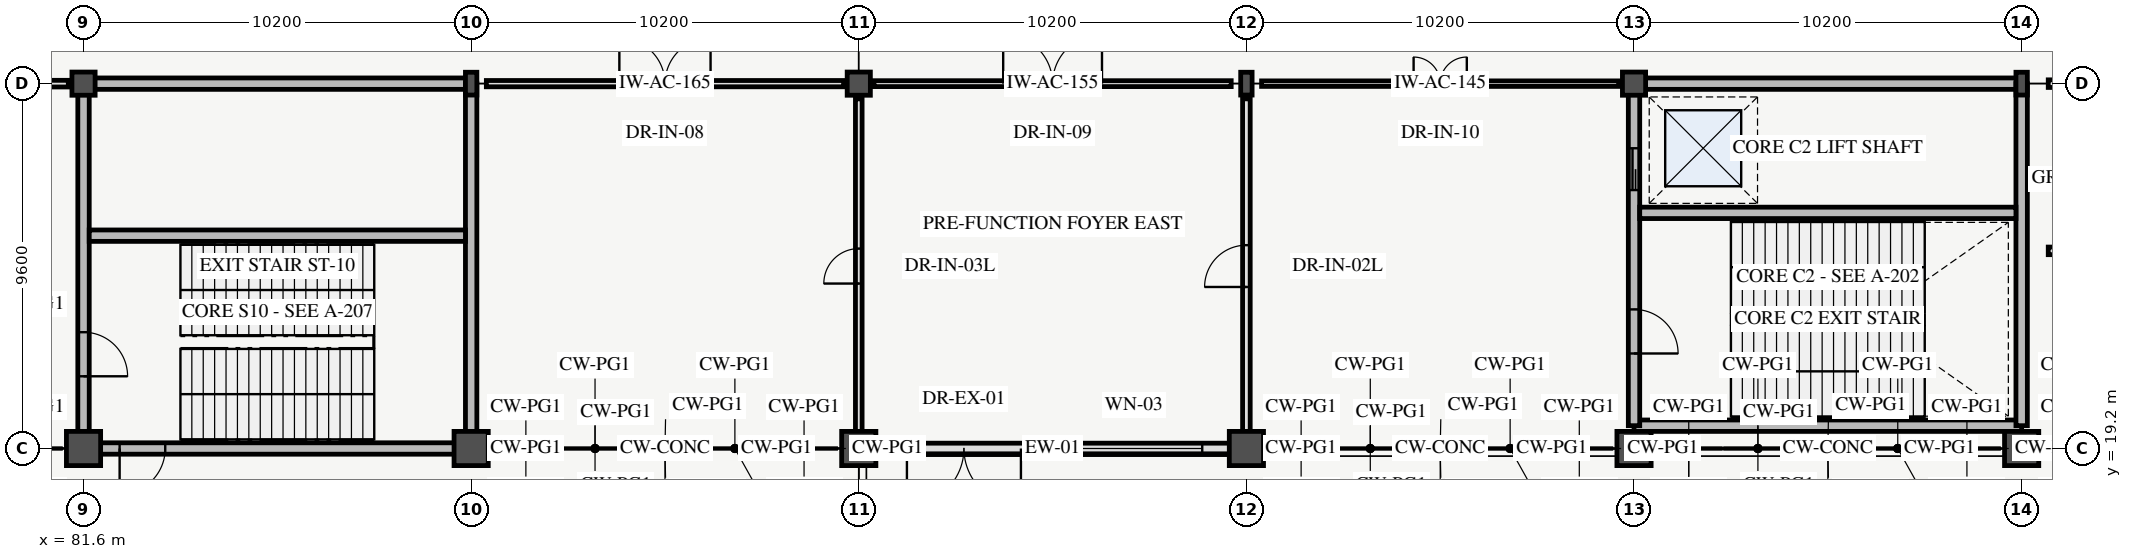
"""IFC4 building model, lengths in metres.
Left out: names, types, materials, properties, quantities, classifications, styles, units other than length and angle.
Written with IfcOpenShell. Run it as: python <this file> out.ifc"""

import sys

from ifc_helpers import new_model, si_unit, direction, frame, frame_2d, origin, origin_2d, place, context, subcontext, project, spatial, rectangle, hollow_circle, i_section, extrude, element, fill, save


model = new_model("IFC4")
c1 = context("Model", 3, precision=1e-05, world=origin(), true_north=direction((0.0, 1.0)))
c2 = subcontext(c1, "Body", "Model", "MODEL_VIEW")
j1 = project(units=[si_unit("LENGTHUNIT", "METRE"), si_unit("PLANEANGLEUNIT", "RADIAN")], contexts=[c1])
p1 = place(None, origin())
s1 = spatial("IfcSite", under=j1, at=p1, CompositionType="ELEMENT")
p2 = place(p1, origin())
s2 = spatial("IfcBuilding", under=s1, at=p2, CompositionType="ELEMENT")
p3 = place(p2, origin())
s3 = spatial("IfcBuildingStorey", under=s2, at=p3, CompositionType="ELEMENT", Elevation=0.0)
p4 = place(p3, frame((81.6, 19.2, 0.0), z_axis=(0.0, 0.0, 1.0), x_axis=(1.0, 0.0, 0.0)))
e1 = element("IfcColumn", 1, at=p4, inside=s3, PredefinedType="COLUMN", context=c2, shape_type="SweptSolid", body=[
    extrude(rectangle(XDim=0.9, YDim=0.9, at=origin_2d()), origin(), (0.0, 0.0, 1.0), 5.4),
])
p5 = place(p3, frame((81.6, 28.8, 0.0), z_axis=(0.0, 0.0, 1.0), x_axis=(1.0, 0.0, 0.0)))
e2 = element("IfcColumn", 2, at=p5, inside=s3, PredefinedType="COLUMN", context=c2, shape_type="SweptSolid", body=[
    extrude(hollow_circle(Radius=0.305, WallThickness=0.025, at=origin_2d()), origin(), (0.0, 0.0, 1.0), 5.4),
])
p6 = place(p3, frame((91.8, 19.2, 0.0), z_axis=(0.0, 0.0, 1.0), x_axis=(1.0, 0.0, 0.0)))
e3 = element("IfcColumn", 3, at=p6, inside=s3, PredefinedType="COLUMN", context=c2, shape_type="SweptSolid", body=[
    extrude(rectangle(XDim=0.9, YDim=0.9, at=origin_2d()), origin(), (0.0, 0.0, 1.0), 5.4),
])
p7 = place(p3, frame((91.8, 28.8, 0.0), z_axis=(0.0, 0.0, 1.0), x_axis=(1.0, 0.0, 0.0)))
e4 = element("IfcColumn", 4, at=p7, inside=s3, PredefinedType="COLUMN", context=c2, shape_type="SweptSolid", body=[
    extrude(i_section(OverallWidth=0.3, OverallDepth=0.6, WebThickness=0.015, FlangeThickness=0.03, FilletRadius=0.027, at=origin_2d()), origin(), (0.0, 0.0, 1.0), 5.4),
])
p8 = place(p3, frame((102.0, 19.2, 0.0), z_axis=(0.0, 0.0, 1.0), x_axis=(1.0, 0.0, 0.0)))
e5 = element("IfcColumn", 5, at=p8, inside=s3, PredefinedType="COLUMN", context=c2, shape_type="SweptSolid", body=[
    extrude(rectangle(XDim=0.9, YDim=0.9, at=origin_2d()), origin(), (0.0, 0.0, 1.0), 5.4),
])
p9 = place(p3, frame((102.0, 28.8, 0.0), z_axis=(0.0, 0.0, 1.0), x_axis=(1.0, 0.0, 0.0)))
e6 = element("IfcColumn", 6, at=p9, inside=s3, PredefinedType="COLUMN", context=c2, shape_type="SweptSolid", body=[
    extrude(hollow_circle(Radius=0.305, WallThickness=0.025, at=origin_2d()), origin(), (0.0, 0.0, 1.0), 5.4),
])
p10 = place(p3, frame((112.2, 19.2, 0.0), z_axis=(0.0, 0.0, 1.0), x_axis=(1.0, 0.0, 0.0)))
e7 = element("IfcColumn", 7, at=p10, inside=s3, PredefinedType="COLUMN", context=c2, shape_type="SweptSolid", body=[
    extrude(rectangle(XDim=0.9, YDim=0.9, at=origin_2d()), origin(), (0.0, 0.0, 1.0), 5.4),
])
p11 = place(p3, frame((112.2, 28.8, 0.0), z_axis=(0.0, 0.0, 1.0), x_axis=(1.0, 0.0, 0.0)))
e8 = element("IfcColumn", 8, at=p11, inside=s3, PredefinedType="COLUMN", context=c2, shape_type="SweptSolid", body=[
    extrude(i_section(OverallWidth=0.3, OverallDepth=0.6, WebThickness=0.015, FlangeThickness=0.03, FilletRadius=0.027, at=origin_2d()), origin(), (0.0, 0.0, 1.0), 5.4),
])
p12 = place(p3, frame((122.4, 19.2, 0.0), z_axis=(0.0, 0.0, 1.0), x_axis=(1.0, 0.0, 0.0)))
e9 = element("IfcColumn", 9, at=p12, inside=s3, PredefinedType="COLUMN", context=c2, shape_type="SweptSolid", body=[
    extrude(rectangle(XDim=0.9, YDim=0.9, at=origin_2d()), origin(), (0.0, 0.0, 1.0), 5.4),
])
p13 = place(p3, frame((122.4, 28.8, 0.0), z_axis=(0.0, 0.0, 1.0), x_axis=(1.0, 0.0, 0.0)))
e10 = element("IfcColumn", 10, at=p13, inside=s3, PredefinedType="COLUMN", context=c2, shape_type="SweptSolid", body=[
    extrude(hollow_circle(Radius=0.305, WallThickness=0.025, at=origin_2d()), origin(), (0.0, 0.0, 1.0), 5.4),
])
p14 = place(p3, frame((132.6, 19.2, 0.0), z_axis=(0.0, 0.0, 1.0), x_axis=(1.0, 0.0, 0.0)))
e11 = element("IfcColumn", 11, at=p14, inside=s3, PredefinedType="COLUMN", context=c2, shape_type="SweptSolid", body=[
    extrude(rectangle(XDim=0.9, YDim=0.9, at=origin_2d()), origin(), (0.0, 0.0, 1.0), 5.4),
])
p15 = place(p3, frame((132.6, 28.8, 0.0), z_axis=(0.0, 0.0, 1.0), x_axis=(1.0, 0.0, 0.0)))
e12 = element("IfcColumn", 12, at=p15, inside=s3, PredefinedType="COLUMN", context=c2, shape_type="SweptSolid", body=[
    extrude(i_section(OverallWidth=0.3, OverallDepth=0.6, WebThickness=0.015, FlangeThickness=0.03, FilletRadius=0.027, at=origin_2d()), origin(), (0.0, 0.0, 1.0), 5.4),
])
for number, where, z_axis, x_axis in (
    (13, (122.4, 19.8, 0.0), (0.0, 0.0, 1.0), (1.0, 0.0, 0.0)),
    (14, (122.4, 28.8, 0.0), (0.0, 0.0, 1.0), (1.0, 0.0, 0.0)),
):
    element("IfcWall", number, at=place(p3, frame(where, z_axis=z_axis, x_axis=x_axis)), inside=s3, PredefinedType="SHEAR", context=c2, shape_type="SweptSolid", body=[
        extrude(rectangle(XDim=10.2, YDim=0.3, at=frame_2d((5.1, 0.0))), origin(), (0.0, 0.0, 1.0), 5.4),
    ])
p16 = place(p3, frame((122.4, 19.8, 0.0), z_axis=(0.0, 0.0, 1.0), x_axis=(0.0, 1.0, 0.0)))
e15 = element("IfcWall", 15, at=p16, inside=s3, PredefinedType="SHEAR", context=c2, shape_type="SweptSolid", body=[
    extrude(rectangle(XDim=9.0, YDim=0.3, at=frame_2d((4.5, 0.0))), origin(), (0.0, 0.0, 1.0), 5.4),
])
p17 = place(p16, frame((1.9, 0.0, 0.0)))
e16 = element("IfcOpeningElement", 16, at=p17, cuts=e15, PredefinedType="OPENING", context=c2, shape_type="SweptSolid", body=[
    extrude(rectangle(XDim=1.16, YDim=2.2, at=frame_2d((0.58, 1.1))), frame((0.0, 0.16, 0.0), z_axis=(0.0, -1.0, 0.0), x_axis=(1.0, 0.0, 0.0)), (0.0, 0.0, 1.0), 0.32),
])
p18 = place(p16, frame((6.2, 0.0, 0.0)))
e17 = element("IfcOpeningElement", 17, at=p18, cuts=e15, PredefinedType="OPENING", context=c2, shape_type="SweptSolid", body=[
    extrude(rectangle(XDim=1.1, YDim=2.2, at=frame_2d((0.55, 1.1))), frame((0.0, 0.16, 0.0), z_axis=(0.0, -1.0, 0.0), x_axis=(1.0, 0.0, 0.0)), (0.0, 0.0, 1.0), 0.32),
])
p19 = place(p3, frame((132.6, 19.8, 0.0), z_axis=(0.0, 0.0, 1.0), x_axis=(0.0, 1.0, 0.0)))
e18 = element("IfcWall", 18, at=p19, inside=s3, PredefinedType="SHEAR", context=c2, shape_type="SweptSolid", body=[
    extrude(rectangle(XDim=9.0, YDim=0.3, at=frame_2d((4.5, 0.0))), origin(), (0.0, 0.0, 1.0), 5.4),
])
p20 = place(p3, frame((102.24, 19.2, 0.0), z_axis=(0.0, 0.0, 1.0), x_axis=(1.0, 0.0, 0.0)))
e19 = element("IfcWall", 19, at=p20, inside=s3, PredefinedType="STANDARD", context=c2, shape_type="SweptSolid", body=[
    extrude(rectangle(XDim=9.72, YDim=0.28, at=frame_2d((4.86, 0.0))), origin(), (0.0, 0.0, 1.0), 3.68),
])
p21 = place(p20, frame((1.027, 0.0, 0.0)))
e20 = element("IfcOpeningElement", 20, at=p21, cuts=e19, PredefinedType="OPENING", context=c2, shape_type="SweptSolid", body=[
    extrude(rectangle(XDim=3.0, YDim=2.5, at=frame_2d((1.5, 1.25))), frame((0.0, 0.15, 0.0), z_axis=(0.0, -1.0, 0.0), x_axis=(1.0, 0.0, 0.0)), (0.0, 0.0, 1.0), 0.3),
])
p22 = place(p20, frame((5.198, 0.0, 0.85)))
e21 = element("IfcOpeningElement", 21, at=p22, cuts=e19, PredefinedType="OPENING", context=c2, shape_type="SweptSolid", body=[
    extrude(rectangle(XDim=3.6, YDim=2.1, at=frame_2d((1.8, 1.05))), frame((0.0, 0.15, 0.0), z_axis=(0.0, -1.0, 0.0), x_axis=(1.0, 0.0, 0.0)), (0.0, 0.0, 1.0), 0.3),
])
p23 = place(p3, frame((122.55, 25.4, 0.0), z_axis=(0.0, 0.0, 1.0), x_axis=(1.0, 0.0, 0.0)))
e22 = element("IfcWall", 22, at=p23, inside=s3, PredefinedType="SHEAR", context=c2, shape_type="SweptSolid", body=[
    extrude(rectangle(XDim=9.9, YDim=0.3, at=frame_2d((4.95, 0.0))), origin(), (0.0, 0.0, 1.0), 5.4),
])
p24 = place(p3, frame((81.6, 19.2, 0.0), z_axis=(0.0, 0.0, 1.0), x_axis=(1.0, 0.0, 0.0)))
e23 = element("IfcWall", 23, at=p24, inside=s3, PredefinedType="SHEAR", context=c2, shape_type="SweptSolid", body=[
    extrude(rectangle(XDim=10.2, YDim=0.3, at=frame_2d((5.1, 0.0))), origin(), (0.0, 0.0, 1.0), 5.4),
])
p25 = place(p24, frame((0.95, 0.0, 0.0)))
e24 = element("IfcOpeningElement", 24, at=p25, cuts=e23, PredefinedType="OPENING", context=c2, shape_type="SweptSolid", body=[
    extrude(rectangle(XDim=1.2, YDim=2.2, at=frame_2d((0.6, 1.1))), frame((0.0, 0.16, 0.0), z_axis=(0.0, -1.0, 0.0), x_axis=(1.0, 0.0, 0.0)), (0.0, 0.0, 1.0), 0.32),
])
p26 = place(p3, frame((81.6, 28.8, 0.0), z_axis=(0.0, 0.0, 1.0), x_axis=(1.0, 0.0, 0.0)))
e25 = element("IfcWall", 25, at=p26, inside=s3, PredefinedType="SHEAR", context=c2, shape_type="SweptSolid", body=[
    extrude(rectangle(XDim=10.2, YDim=0.3, at=frame_2d((5.1, 0.0))), origin(), (0.0, 0.0, 1.0), 5.4),
])
p27 = place(p3, frame((81.6, 19.2, 0.0), z_axis=(0.0, 0.0, 1.0), x_axis=(0.0, 1.0, 0.0)))
e26 = element("IfcWall", 26, at=p27, inside=s3, PredefinedType="SHEAR", context=c2, shape_type="SweptSolid", body=[
    extrude(rectangle(XDim=9.6, YDim=0.3, at=frame_2d((4.8, 0.0))), origin(), (0.0, 0.0, 1.0), 5.4),
])
p28 = place(p27, frame((1.9, 0.0, 0.0)))
e27 = element("IfcOpeningElement", 27, at=p28, cuts=e26, PredefinedType="OPENING", context=c2, shape_type="SweptSolid", body=[
    extrude(rectangle(XDim=1.16, YDim=2.2, at=frame_2d((0.58, 1.1))), frame((0.0, 0.16, 0.0), z_axis=(0.0, -1.0, 0.0), x_axis=(1.0, 0.0, 0.0)), (0.0, 0.0, 1.0), 0.32),
])
p29 = place(p3, frame((91.8, 19.2, 0.0), z_axis=(0.0, 0.0, 1.0), x_axis=(0.0, 1.0, 0.0)))
e28 = element("IfcWall", 28, at=p29, inside=s3, PredefinedType="SHEAR", context=c2, shape_type="SweptSolid", body=[
    extrude(rectangle(XDim=9.6, YDim=0.3, at=frame_2d((4.8, 0.0))), origin(), (0.0, 0.0, 1.0), 5.4),
])
p30 = place(p3, frame((81.75, 24.8, 0.0), z_axis=(0.0, 0.0, 1.0), x_axis=(1.0, 0.0, 0.0)))
e29 = element("IfcWall", 29, at=p30, inside=s3, PredefinedType="SHEAR", context=c2, shape_type="SweptSolid", body=[
    extrude(rectangle(XDim=9.9, YDim=0.3, at=frame_2d((4.95, 0.0))), origin(), (0.0, 0.0, 1.0), 5.4),
])
p31 = place(p3, frame((71.8, 28.8, 0.0), z_axis=(0.0, 0.0, 1.0), x_axis=(1.0, 0.0, 0.0)))
e30 = element("IfcWall", 30, at=p31, inside=s3, PredefinedType="PARTITIONING", context=c2, shape_type="SweptSolid", body=[
    extrude(rectangle(XDim=9.4, YDim=0.175, at=frame_2d((4.7, 0.0))), origin(), (0.0, 0.0, 1.0), 4.08),
])
p32 = place(p31, frame((3.6, 0.0, 0.0)))
e31 = element("IfcOpeningElement", 31, at=p32, cuts=e30, PredefinedType="OPENING", context=c2, shape_type="SweptSolid", body=[
    extrude(rectangle(XDim=2.2, YDim=2.35, at=frame_2d((1.1, 1.175))), frame((0.0, 0.097, 0.0), z_axis=(0.0, -1.0, 0.0), x_axis=(1.0, 0.0, 0.0)), (0.0, 0.0, 1.0), 0.195),
])
p33 = place(p3, frame((92.2, 28.8, 0.0), z_axis=(0.0, 0.0, 1.0), x_axis=(1.0, 0.0, 0.0)))
e32 = element("IfcWall", 32, at=p33, inside=s3, PredefinedType="PARTITIONING", context=c2, shape_type="SweptSolid", body=[
    extrude(rectangle(XDim=9.4, YDim=0.165, at=frame_2d((4.7, 0.0))), origin(), (0.0, 0.0, 1.0), 4.08),
])
p34 = place(p33, frame((3.5, 0.0, 0.0)))
e33 = element("IfcOpeningElement", 33, at=p34, cuts=e32, PredefinedType="OPENING", context=c2, shape_type="SweptSolid", body=[
    extrude(rectangle(XDim=2.4, YDim=2.4, at=frame_2d((1.2, 1.2))), frame((0.0, 0.093, 0.0), z_axis=(0.0, -1.0, 0.0), x_axis=(1.0, 0.0, 0.0)), (0.0, 0.0, 1.0), 0.185),
])
p35 = place(p3, frame((102.4, 28.8, 0.0), z_axis=(0.0, 0.0, 1.0), x_axis=(1.0, 0.0, 0.0)))
e34 = element("IfcWall", 34, at=p35, inside=s3, PredefinedType="PARTITIONING", context=c2, shape_type="SweptSolid", body=[
    extrude(rectangle(XDim=9.4, YDim=0.155, at=frame_2d((4.7, 0.0))), origin(), (0.0, 0.0, 1.0), 4.08),
])
p36 = place(p35, frame((3.4, 0.0, 0.0)))
e35 = element("IfcOpeningElement", 35, at=p36, cuts=e34, PredefinedType="OPENING", context=c2, shape_type="SweptSolid", body=[
    extrude(rectangle(XDim=2.6, YDim=2.4, at=frame_2d((1.3, 1.2))), frame((0.0, 0.087, 0.0), z_axis=(0.0, -1.0, 0.0), x_axis=(1.0, 0.0, 0.0)), (0.0, 0.0, 1.0), 0.175),
])
p37 = place(p3, frame((112.6, 28.8, 0.0), z_axis=(0.0, 0.0, 1.0), x_axis=(1.0, 0.0, 0.0)))
e36 = element("IfcWall", 36, at=p37, inside=s3, PredefinedType="PARTITIONING", context=c2, shape_type="SweptSolid", body=[
    extrude(rectangle(XDim=9.4, YDim=0.145, at=frame_2d((4.7, 0.0))), origin(), (0.0, 0.0, 1.0), 4.08),
])
p38 = place(p37, frame((4.0, 0.0, 0.0)))
e37 = element("IfcOpeningElement", 37, at=p38, cuts=e36, PredefinedType="OPENING", context=c2, shape_type="SweptSolid", body=[
    extrude(rectangle(XDim=1.4, YDim=2.2, at=frame_2d((0.7, 1.1))), frame((0.0, 0.083, 0.0), z_axis=(0.0, -1.0, 0.0), x_axis=(1.0, 0.0, 0.0)), (0.0, 0.0, 1.0), 0.165),
])
p39 = place(p3, frame((133.3, 24.4, 0.0), z_axis=(0.0, 0.0, 1.0), x_axis=(1.0, 0.0, 0.0)))
e38 = element("IfcWall", 38, at=p39, inside=s3, PredefinedType="PARTITIONING", context=c2, shape_type="SweptSolid", body=[
    extrude(rectangle(XDim=4.0, YDim=0.2, at=frame_2d((2.0, 0.0))), origin(), (0.0, 0.0, 1.0), 4.08),
])
p40 = place(p39, frame((1.475, 0.0, 0.0)))
e39 = element("IfcOpeningElement", 39, at=p40, cuts=e38, PredefinedType="OPENING", context=c2, shape_type="SweptSolid", body=[
    extrude(rectangle(XDim=1.05, YDim=2.15, at=frame_2d((0.525, 1.075))), frame((0.0, 0.11, 0.0), z_axis=(0.0, -1.0, 0.0), x_axis=(1.0, 0.0, 0.0)), (0.0, 0.0, 1.0), 0.22),
])
p41 = place(p3, frame((133.3, 28.8, 0.0), z_axis=(0.0, 0.0, 1.0), x_axis=(1.0, 0.0, 0.0)))
e40 = element("IfcWall", 40, at=p41, inside=s3, PredefinedType="PARTITIONING", context=c2, shape_type="SweptSolid", body=[
    extrude(rectangle(XDim=9.1, YDim=0.2, at=frame_2d((4.55, 0.0))), origin(), (0.0, 0.0, 1.0), 4.08),
])
p42 = place(p41, frame((3.975, 0.0, 0.0)))
e41 = element("IfcOpeningElement", 41, at=p42, cuts=e40, PredefinedType="OPENING", context=c2, shape_type="SweptSolid", body=[
    extrude(rectangle(XDim=1.15, YDim=2.2, at=frame_2d((0.575, 1.1))), frame((0.0, 0.11, 0.0), z_axis=(0.0, -1.0, 0.0), x_axis=(1.0, 0.0, 0.0)), (0.0, 0.0, 1.0), 0.22),
])
p43 = place(p3, frame((112.2, 19.6, 0.0), z_axis=(0.0, 0.0, 1.0), x_axis=(0.0, 1.0, 0.0)))
e42 = element("IfcWall", 42, at=p43, inside=s3, PredefinedType="PARTITIONING", context=c2, shape_type="SweptSolid", body=[
    extrude(rectangle(XDim=8.8, YDim=0.2, at=frame_2d((4.4, 0.0))), origin(), (0.0, 0.0, 1.0), 4.08),
])
p44 = place(p43, frame((3.85, 0.0, 0.0)))
e43 = element("IfcOpeningElement", 43, at=p44, cuts=e42, PredefinedType="OPENING", context=c2, shape_type="SweptSolid", body=[
    extrude(rectangle(XDim=1.1, YDim=2.2, at=frame_2d((0.55, 1.1))), frame((0.0, 0.11, 0.0), z_axis=(0.0, -1.0, 0.0), x_axis=(1.0, 0.0, 0.0)), (0.0, 0.0, 1.0), 0.22),
])
p45 = place(p3, frame((102.0, 19.6, 0.0), z_axis=(0.0, 0.0, 1.0), x_axis=(0.0, 1.0, 0.0)))
e44 = element("IfcWall", 44, at=p45, inside=s3, PredefinedType="PARTITIONING", context=c2, shape_type="SweptSolid", body=[
    extrude(rectangle(XDim=8.8, YDim=0.175, at=frame_2d((4.4, 0.0))), origin(), (0.0, 0.0, 1.0), 4.08),
])
p46 = place(p45, frame((3.94, 0.0, 0.0)))
e45 = element("IfcOpeningElement", 45, at=p46, cuts=e44, PredefinedType="OPENING", context=c2, shape_type="SweptSolid", body=[
    extrude(rectangle(XDim=0.92, YDim=2.1, at=frame_2d((0.46, 1.05))), frame((0.0, 0.097, 0.0), z_axis=(0.0, -1.0, 0.0), x_axis=(1.0, 0.0, 0.0)), (0.0, 0.0, 1.0), 0.195),
])
p47 = place(p21, frame((3.0, 0.0, 0.0), z_axis=(0.0, 0.0, 1.0), x_axis=(-1.0, 0.0, 0.0)))
e46 = element("IfcDoor", 46, at=p47, inside=s3, OperationType="DOUBLE_DOOR_SINGLE_SWING", PredefinedType="DOOR", context=c2, shape_type="SweptSolid", body=[
    extrude(rectangle(XDim=3.0, YDim=2.5, at=frame_2d((1.5, 1.25))), frame((0.0, 0.025, 0.0), z_axis=(0.0, -1.0, 0.0), x_axis=(1.0, 0.0, 0.0)), (0.0, 0.0, 1.0), 0.05),
])
fill(e20, e46)
p48 = place(p22, origin())
e47 = element("IfcWindow", 47, at=p48, inside=s3, PartitioningType="TRIPLE_PANEL_VERTICAL", PredefinedType="WINDOW", context=c2, shape_type="SweptSolid", body=[
    extrude(rectangle(XDim=3.6, YDim=2.1, at=frame_2d((1.8, 1.05))), frame((0.0, 0.03, 0.0), z_axis=(0.0, -1.0, 0.0), x_axis=(1.0, 0.0, 0.0)), (0.0, 0.0, 1.0), 0.06),
])
fill(e21, e47)
p49 = place(p17, origin())
e48 = element("IfcDoor", 48, at=p49, inside=s3, OperationType="SINGLE_SWING_LEFT", PredefinedType="DOOR", context=c2, shape_type="SweptSolid", body=[
    extrude(rectangle(XDim=1.16, YDim=2.2, at=frame_2d((0.58, 1.1))), frame((0.0, 0.025, 0.0), z_axis=(0.0, -1.0, 0.0), x_axis=(1.0, 0.0, 0.0)), (0.0, 0.0, 1.0), 0.05),
])
fill(e16, e48)
p50 = place(p18, origin())
e49 = element("IfcDoor", 49, at=p50, inside=s3, OperationType="SLIDING_TO_RIGHT", PredefinedType="DOOR", context=c2, shape_type="SweptSolid", body=[
    extrude(rectangle(XDim=1.1, YDim=2.2, at=frame_2d((0.55, 1.1))), frame((0.0, 0.025, 0.0), z_axis=(0.0, -1.0, 0.0), x_axis=(1.0, 0.0, 0.0)), (0.0, 0.0, 1.0), 0.05),
])
fill(e17, e49)
p51 = place(p28, origin())
e50 = element("IfcDoor", 50, at=p51, inside=s3, OperationType="SINGLE_SWING_LEFT", PredefinedType="DOOR", context=c2, shape_type="SweptSolid", body=[
    extrude(rectangle(XDim=1.16, YDim=2.2, at=frame_2d((0.58, 1.1))), frame((0.0, 0.025, 0.0), z_axis=(0.0, -1.0, 0.0), x_axis=(1.0, 0.0, 0.0)), (0.0, 0.0, 1.0), 0.05),
])
fill(e27, e50)
p52 = place(p25, frame((1.2, 0.0, 0.0), z_axis=(0.0, 0.0, 1.0), x_axis=(-1.0, 0.0, 0.0)))
e51 = element("IfcDoor", 51, at=p52, inside=s3, OperationType="SINGLE_SWING_LEFT", PredefinedType="DOOR", context=c2, shape_type="SweptSolid", body=[
    extrude(rectangle(XDim=1.2, YDim=2.2, at=frame_2d((0.6, 1.1))), frame((0.0, 0.025, 0.0), z_axis=(0.0, -1.0, 0.0), x_axis=(1.0, 0.0, 0.0)), (0.0, 0.0, 1.0), 0.05),
])
fill(e24, e51)
p53 = place(p34, origin())
e52 = element("IfcDoor", 52, at=p53, inside=s3, OperationType="DOUBLE_DOOR_SINGLE_SWING", PredefinedType="DOOR", context=c2, shape_type="SweptSolid", body=[
    extrude(rectangle(XDim=2.4, YDim=2.4, at=frame_2d((1.2, 1.2))), frame((0.0, 0.025, 0.0), z_axis=(0.0, -1.0, 0.0), x_axis=(1.0, 0.0, 0.0)), (0.0, 0.0, 1.0), 0.05),
])
fill(e33, e52)
p54 = place(p36, origin())
e53 = element("IfcDoor", 53, at=p54, inside=s3, OperationType="DOUBLE_DOOR_SINGLE_SWING", PredefinedType="DOOR", context=c2, shape_type="SweptSolid", body=[
    extrude(rectangle(XDim=2.6, YDim=2.4, at=frame_2d((1.3, 1.2))), frame((0.0, 0.025, 0.0), z_axis=(0.0, -1.0, 0.0), x_axis=(1.0, 0.0, 0.0)), (0.0, 0.0, 1.0), 0.05),
])
fill(e35, e53)
p55 = place(p38, origin())
e54 = element("IfcDoor", 54, at=p55, inside=s3, OperationType="DOUBLE_DOOR_SINGLE_SWING", PredefinedType="DOOR", context=c2, shape_type="SweptSolid", body=[
    extrude(rectangle(XDim=1.4, YDim=2.2, at=frame_2d((0.7, 1.1))), frame((0.0, 0.025, 0.0), z_axis=(0.0, -1.0, 0.0), x_axis=(1.0, 0.0, 0.0)), (0.0, 0.0, 1.0), 0.05),
])
fill(e37, e54)
p56 = place(p44, origin())
e55 = element("IfcDoor", 55, at=p56, inside=s3, OperationType="SINGLE_SWING_LEFT", PredefinedType="DOOR", context=c2, shape_type="SweptSolid", body=[
    extrude(rectangle(XDim=1.1, YDim=2.2, at=frame_2d((0.55, 1.1))), frame((0.0, 0.025, 0.0), z_axis=(0.0, -1.0, 0.0), x_axis=(1.0, 0.0, 0.0)), (0.0, 0.0, 1.0), 0.05),
])
fill(e43, e55)
p57 = place(p46, origin())
e56 = element("IfcDoor", 56, at=p57, inside=s3, OperationType="SINGLE_SWING_LEFT", PredefinedType="DOOR", context=c2, shape_type="SweptSolid", body=[
    extrude(rectangle(XDim=0.92, YDim=2.1, at=frame_2d((0.46, 1.05))), frame((0.0, 0.025, 0.0), z_axis=(0.0, -1.0, 0.0), x_axis=(1.0, 0.0, 0.0)), (0.0, 0.0, 1.0), 0.05),
])
fill(e45, e56)
save(model, sys.argv[1])
